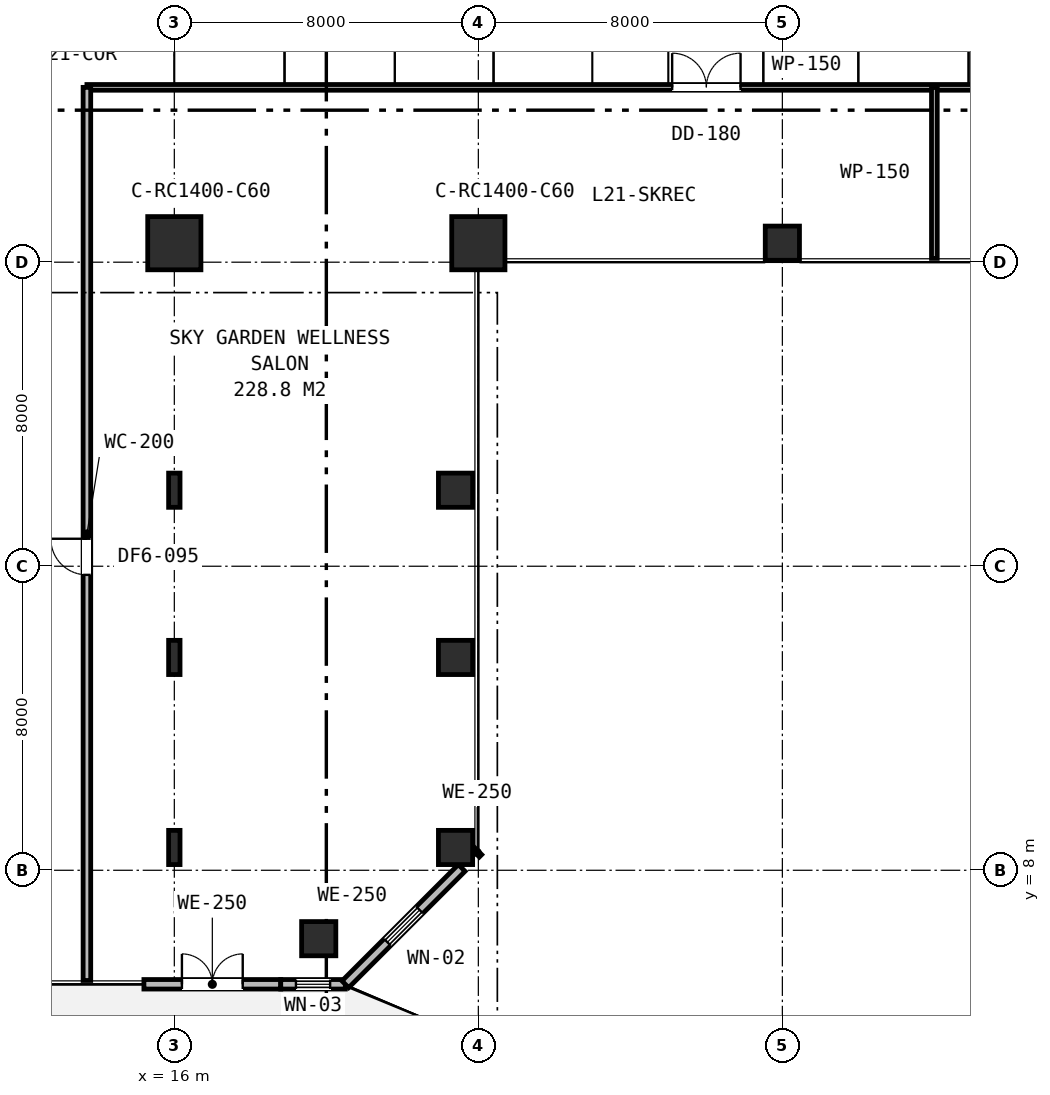
"""IFC4 building model, lengths in metres.
Left out: names, types, materials, properties, quantities, classifications, styles, units other than length and angle.
Written with IfcOpenShell. Run it as: python <this file> out.ifc"""

import sys

from ifc_helpers import new_model, si_unit, direction, frame, frame_2d, origin, origin_2d, place, context, subcontext, project, spatial, rectangle, i_section, extrude, element, fill, save


model = new_model("IFC4")
c1 = context("Model", 3, precision=1e-05, world=origin(), true_north=direction((0.0, 1.0)))
c2 = subcontext(c1, "Body", "Model", "MODEL_VIEW")
j1 = project(units=[si_unit("LENGTHUNIT", "METRE"), si_unit("PLANEANGLEUNIT", "RADIAN")], contexts=[c1])
p1 = place(None, origin())
s1 = spatial("IfcSite", under=j1, at=p1, CompositionType="ELEMENT")
p2 = place(p1, origin())
s2 = spatial("IfcBuilding", under=s1, at=p2, CompositionType="ELEMENT")
p3 = place(p2, frame((0.0, 0.0, 84.6)))
s3 = spatial("IfcBuildingStorey", under=s2, at=p3, CompositionType="ELEMENT", Elevation=84.6)
for number, where, z_axis, x_axis in (
    (1, (16.0, 24.5, 0.0), (0.0, 0.0, 1.0), (1.0, 0.0, 0.0)),
    (2, (24.0, 24.5, 0.0), (0.0, 0.0, 1.0), (1.0, 0.0, 0.0)),
):
    element("IfcColumn", number, at=place(p3, frame(where, z_axis=z_axis, x_axis=x_axis)), inside=s3, PredefinedType="COLUMN", context=c2, shape_type="SweptSolid", body=[
        extrude(rectangle(XDim=1.4, YDim=1.4, at=origin_2d()), origin(), (0.0, 0.0, 1.0), 5.4),
    ])
for number, where, z_axis, x_axis in (
    (3, (32.0, 24.5, 0.0), (0.0, 0.0, 1.0), (1.0, 0.0, 0.0)),
    (4, (19.8, 6.2, 0.0), (0.0, 0.0, 1.0), (1.0, 0.0, 0.0)),
    (5, (23.4, 8.6, 0.0), (0.0, 0.0, 1.0), (1.0, 0.0, 0.0)),
    (6, (23.4, 13.6, 0.0), (0.0, 0.0, 1.0), (1.0, 0.0, 0.0)),
    (7, (23.4, 18.0, 0.0), (0.0, 0.0, 1.0), (1.0, 0.0, 0.0)),
):
    element("IfcColumn", number, at=place(p3, frame(where, z_axis=z_axis, x_axis=x_axis)), inside=s3, PredefinedType="COLUMN", context=c2, shape_type="SweptSolid", body=[
        extrude(rectangle(XDim=0.9, YDim=0.9, at=origin_2d()), origin(), (0.0, 0.0, 1.0), 5.4),
    ])
for number, where, z_axis, x_axis in (
    (8, (16.0, 8.6, 0.0), (0.0, 0.0, 1.0), (1.0, 0.0, 0.0)),
    (9, (16.0, 13.6, 0.0), (0.0, 0.0, 1.0), (1.0, 0.0, 0.0)),
    (10, (16.0, 18.0, 0.0), (0.0, 0.0, 1.0), (1.0, 0.0, 0.0)),
):
    element("IfcColumn", number, at=place(p3, frame(where, z_axis=z_axis, x_axis=x_axis)), inside=s3, PredefinedType="COLUMN", context=c2, shape_type="SweptSolid", body=[
        extrude(i_section(OverallWidth=0.3, OverallDepth=0.9, WebThickness=0.018, FlangeThickness=0.035, FilletRadius=0.03, at=origin_2d()), origin(), (0.0, 0.0, 1.0), 5.4),
    ])
p4 = place(p3, frame((15.2, 5.0, 0.0), z_axis=(0.0, 0.0, 1.0), x_axis=(1.0, 0.0, 0.0)))
e11 = element("IfcWall", 11, at=p4, inside=s3, PredefinedType="STANDARD", context=c2, shape_type="SweptSolid", body=[
    extrude(rectangle(XDim=3.6, YDim=0.25, at=frame_2d((1.8, 0.0))), origin(), (0.0, 0.0, 1.0), 5.13),
])
p5 = place(p4, frame((1.0, 0.0, 0.0)))
e12 = element("IfcOpeningElement", 12, at=p5, cuts=e11, PredefinedType="OPENING", context=c2, shape_type="SweptSolid", body=[
    extrude(rectangle(XDim=1.6, YDim=2.2, at=frame_2d((0.8, 1.1))), frame((0.0, 0.135, 0.0), z_axis=(0.0, -1.0, 0.0), x_axis=(1.0, 0.0, 0.0)), (0.0, 0.0, 1.0), 0.27),
])
p6 = place(p3, frame((18.8, 5.0, 0.0), z_axis=(0.0, 0.0, 1.0), x_axis=(1.0, 0.0, 0.0)))
e13 = element("IfcWall", 13, at=p6, inside=s3, PredefinedType="STANDARD", context=c2, shape_type="SweptSolid", body=[
    extrude(rectangle(XDim=1.7, YDim=0.25, at=frame_2d((0.85, 0.0))), origin(), (0.0, 0.0, 1.0), 5.13),
])
p7 = place(p6, frame((0.4, 0.0, 0.9)))
e14 = element("IfcOpeningElement", 14, at=p7, cuts=e13, PredefinedType="OPENING", context=c2, shape_type="SweptSolid", body=[
    extrude(rectangle(XDim=0.9, YDim=1.55, at=frame_2d((0.45, 0.775))), frame((0.0, 0.135, 0.0), z_axis=(0.0, -1.0, 0.0), x_axis=(1.0, 0.0, 0.0)), (0.0, 0.0, 1.0), 0.27),
])
p8 = place(p3, frame((20.5, 5.0, 0.0), z_axis=(0.0, 0.0, 1.0), x_axis=(0.707106781187, 0.707106781187, 0.0)))
e15 = element("IfcWall", 15, at=p8, inside=s3, PredefinedType="STANDARD", context=c2, shape_type="SweptSolid", body=[
    extrude(rectangle(XDim=4.33, YDim=0.25, at=frame_2d((2.165, 0.0))), origin(), (0.0, 0.0, 1.0), 5.13),
])
p9 = place(p8, frame((1.565, 0.0, 0.85)))
e16 = element("IfcOpeningElement", 16, at=p9, cuts=e15, PredefinedType="OPENING", context=c2, shape_type="SweptSolid", body=[
    extrude(rectangle(XDim=1.2, YDim=1.6, at=frame_2d((0.6, 0.8))), frame((0.0, 0.135, 0.0), z_axis=(0.0, -1.0, 0.0), x_axis=(1.0, 0.0, 0.0)), (0.0, 0.0, 1.0), 0.27),
])
p10 = place(p3, frame((23.938, 8.438, 0.0), z_axis=(0.0, 0.0, 1.0), x_axis=(0.707106781187, 0.707106781187, 0.0)))
e17 = element("IfcWall", 17, at=p10, inside=s3, PredefinedType="STANDARD", context=c2, shape_type="SweptSolid", body=[
    extrude(rectangle(XDim=0.087, YDim=0.25, at=frame_2d((0.044, 0.0))), origin(), (0.0, 0.0, 1.0), 5.13),
])
p11 = place(p3, frame((13.7, 28.6, 0.0), z_axis=(0.0, 0.0, 1.0), x_axis=(1.0, 0.0, 0.0)))
e18 = element("IfcWall", 18, at=p11, inside=s3, PredefinedType="PARTITIONING", context=c2, shape_type="SweptSolid", body=[
    extrude(rectangle(XDim=37.2, YDim=0.15, at=frame_2d((18.6, 0.0))), origin(), (0.0, 0.0, 1.0), 4.63),
])
p12 = place(p11, frame((15.4, 0.0, 0.0)))
e19 = element("IfcOpeningElement", 19, at=p12, cuts=e18, PredefinedType="OPENING", context=c2, shape_type="SweptSolid", body=[
    extrude(rectangle(XDim=1.8, YDim=2.15, at=frame_2d((0.9, 1.075))), frame((0.0, 0.085, 0.0), z_axis=(0.0, -1.0, 0.0), x_axis=(1.0, 0.0, 0.0)), (0.0, 0.0, 1.0), 0.17),
])
p13 = place(p11, frame((27.46, 0.0, 0.0)))
e20 = element("IfcOpeningElement", 20, at=p13, cuts=e18, PredefinedType="OPENING", context=c2, shape_type="SweptSolid", body=[
    extrude(rectangle(XDim=1.8, YDim=2.15, at=frame_2d((0.9, 1.075))), frame((0.0, 0.085, 0.0), z_axis=(0.0, -1.0, 0.0), x_axis=(1.0, 0.0, 0.0)), (0.0, 0.0, 1.0), 0.17),
])
p14 = place(p3, frame((36.0, 24.1, 0.0), z_axis=(0.0, 0.0, 1.0), x_axis=(0.0, 1.0, 0.0)))
e21 = element("IfcWall", 21, at=p14, inside=s3, PredefinedType="PARTITIONING", context=c2, shape_type="SweptSolid", body=[
    extrude(rectangle(XDim=4.5, YDim=0.15, at=frame_2d((2.25, 0.0))), origin(), (0.0, 0.0, 1.0), 4.72),
])
p15 = place(p3, frame((13.7, 5.1, 0.0), z_axis=(0.0, 0.0, 1.0), x_axis=(0.0, 1.0, 0.0)))
e22 = element("IfcWall", 22, at=p15, inside=s3, PredefinedType="PARTITIONING", context=c2, shape_type="SweptSolid", body=[
    extrude(rectangle(XDim=23.5, YDim=0.2, at=frame_2d((11.75, 0.0))), origin(), (0.0, 0.0, 1.0), 4.63),
])
p16 = place(p15, frame((10.673, 0.0, 0.0)))
e23 = element("IfcOpeningElement", 23, at=p16, cuts=e22, PredefinedType="OPENING", context=c2, shape_type="SweptSolid", body=[
    extrude(rectangle(XDim=0.95, YDim=2.15, at=frame_2d((0.475, 1.075))), frame((0.0, 0.11, 0.0), z_axis=(0.0, -1.0, 0.0), x_axis=(1.0, 0.0, 0.0)), (0.0, 0.0, 1.0), 0.22),
])
p17 = place(p5, origin())
e24 = element("IfcDoor", 24, at=p17, inside=s3, OperationType="DOUBLE_DOOR_SINGLE_SWING", PredefinedType="DOOR", context=c2, shape_type="SweptSolid", body=[
    extrude(rectangle(XDim=1.6, YDim=2.2, at=frame_2d((0.8, 1.1))), frame((0.0, 0.025, 0.0), z_axis=(0.0, -1.0, 0.0), x_axis=(1.0, 0.0, 0.0)), (0.0, 0.0, 1.0), 0.05),
])
fill(e12, e24)
p18 = place(p7, origin())
e25 = element("IfcWindow", 25, at=p18, inside=s3, PartitioningType="SINGLE_PANEL", PredefinedType="WINDOW", context=c2, shape_type="SweptSolid", body=[
    extrude(rectangle(XDim=0.9, YDim=1.55, at=frame_2d((0.45, 0.775))), frame((0.0, 0.03, 0.0), z_axis=(0.0, -1.0, 0.0), x_axis=(1.0, 0.0, 0.0)), (0.0, 0.0, 1.0), 0.06),
])
fill(e14, e25)
p19 = place(p9, origin())
e26 = element("IfcWindow", 26, at=p19, inside=s3, PartitioningType="SINGLE_PANEL", PredefinedType="WINDOW", context=c2, shape_type="SweptSolid", body=[
    extrude(rectangle(XDim=1.2, YDim=1.6, at=frame_2d((0.6, 0.8))), frame((0.0, 0.03, 0.0), z_axis=(0.0, -1.0, 0.0), x_axis=(1.0, 0.0, 0.0)), (0.0, 0.0, 1.0), 0.06),
])
fill(e16, e26)
p20 = place(p12, origin())
e27 = element("IfcDoor", 27, at=p20, inside=s3, OperationType="DOUBLE_DOOR_SINGLE_SWING", PredefinedType="DOOR", context=c2, shape_type="SweptSolid", body=[
    extrude(rectangle(XDim=1.8, YDim=2.15, at=frame_2d((0.9, 1.075))), frame((0.0, 0.025, 0.0), z_axis=(0.0, -1.0, 0.0), x_axis=(1.0, 0.0, 0.0)), (0.0, 0.0, 1.0), 0.05),
])
fill(e19, e27)
p21 = place(p16, origin())
e28 = element("IfcDoor", 28, at=p21, inside=s3, OperationType="SINGLE_SWING_RIGHT", PredefinedType="DOOR", context=c2, shape_type="SweptSolid", body=[
    extrude(rectangle(XDim=0.95, YDim=2.15, at=frame_2d((0.475, 1.075))), frame((0.0, 0.025, 0.0), z_axis=(0.0, -1.0, 0.0), x_axis=(1.0, 0.0, 0.0)), (0.0, 0.0, 1.0), 0.05),
])
fill(e23, e28)
save(model, sys.argv[1])
